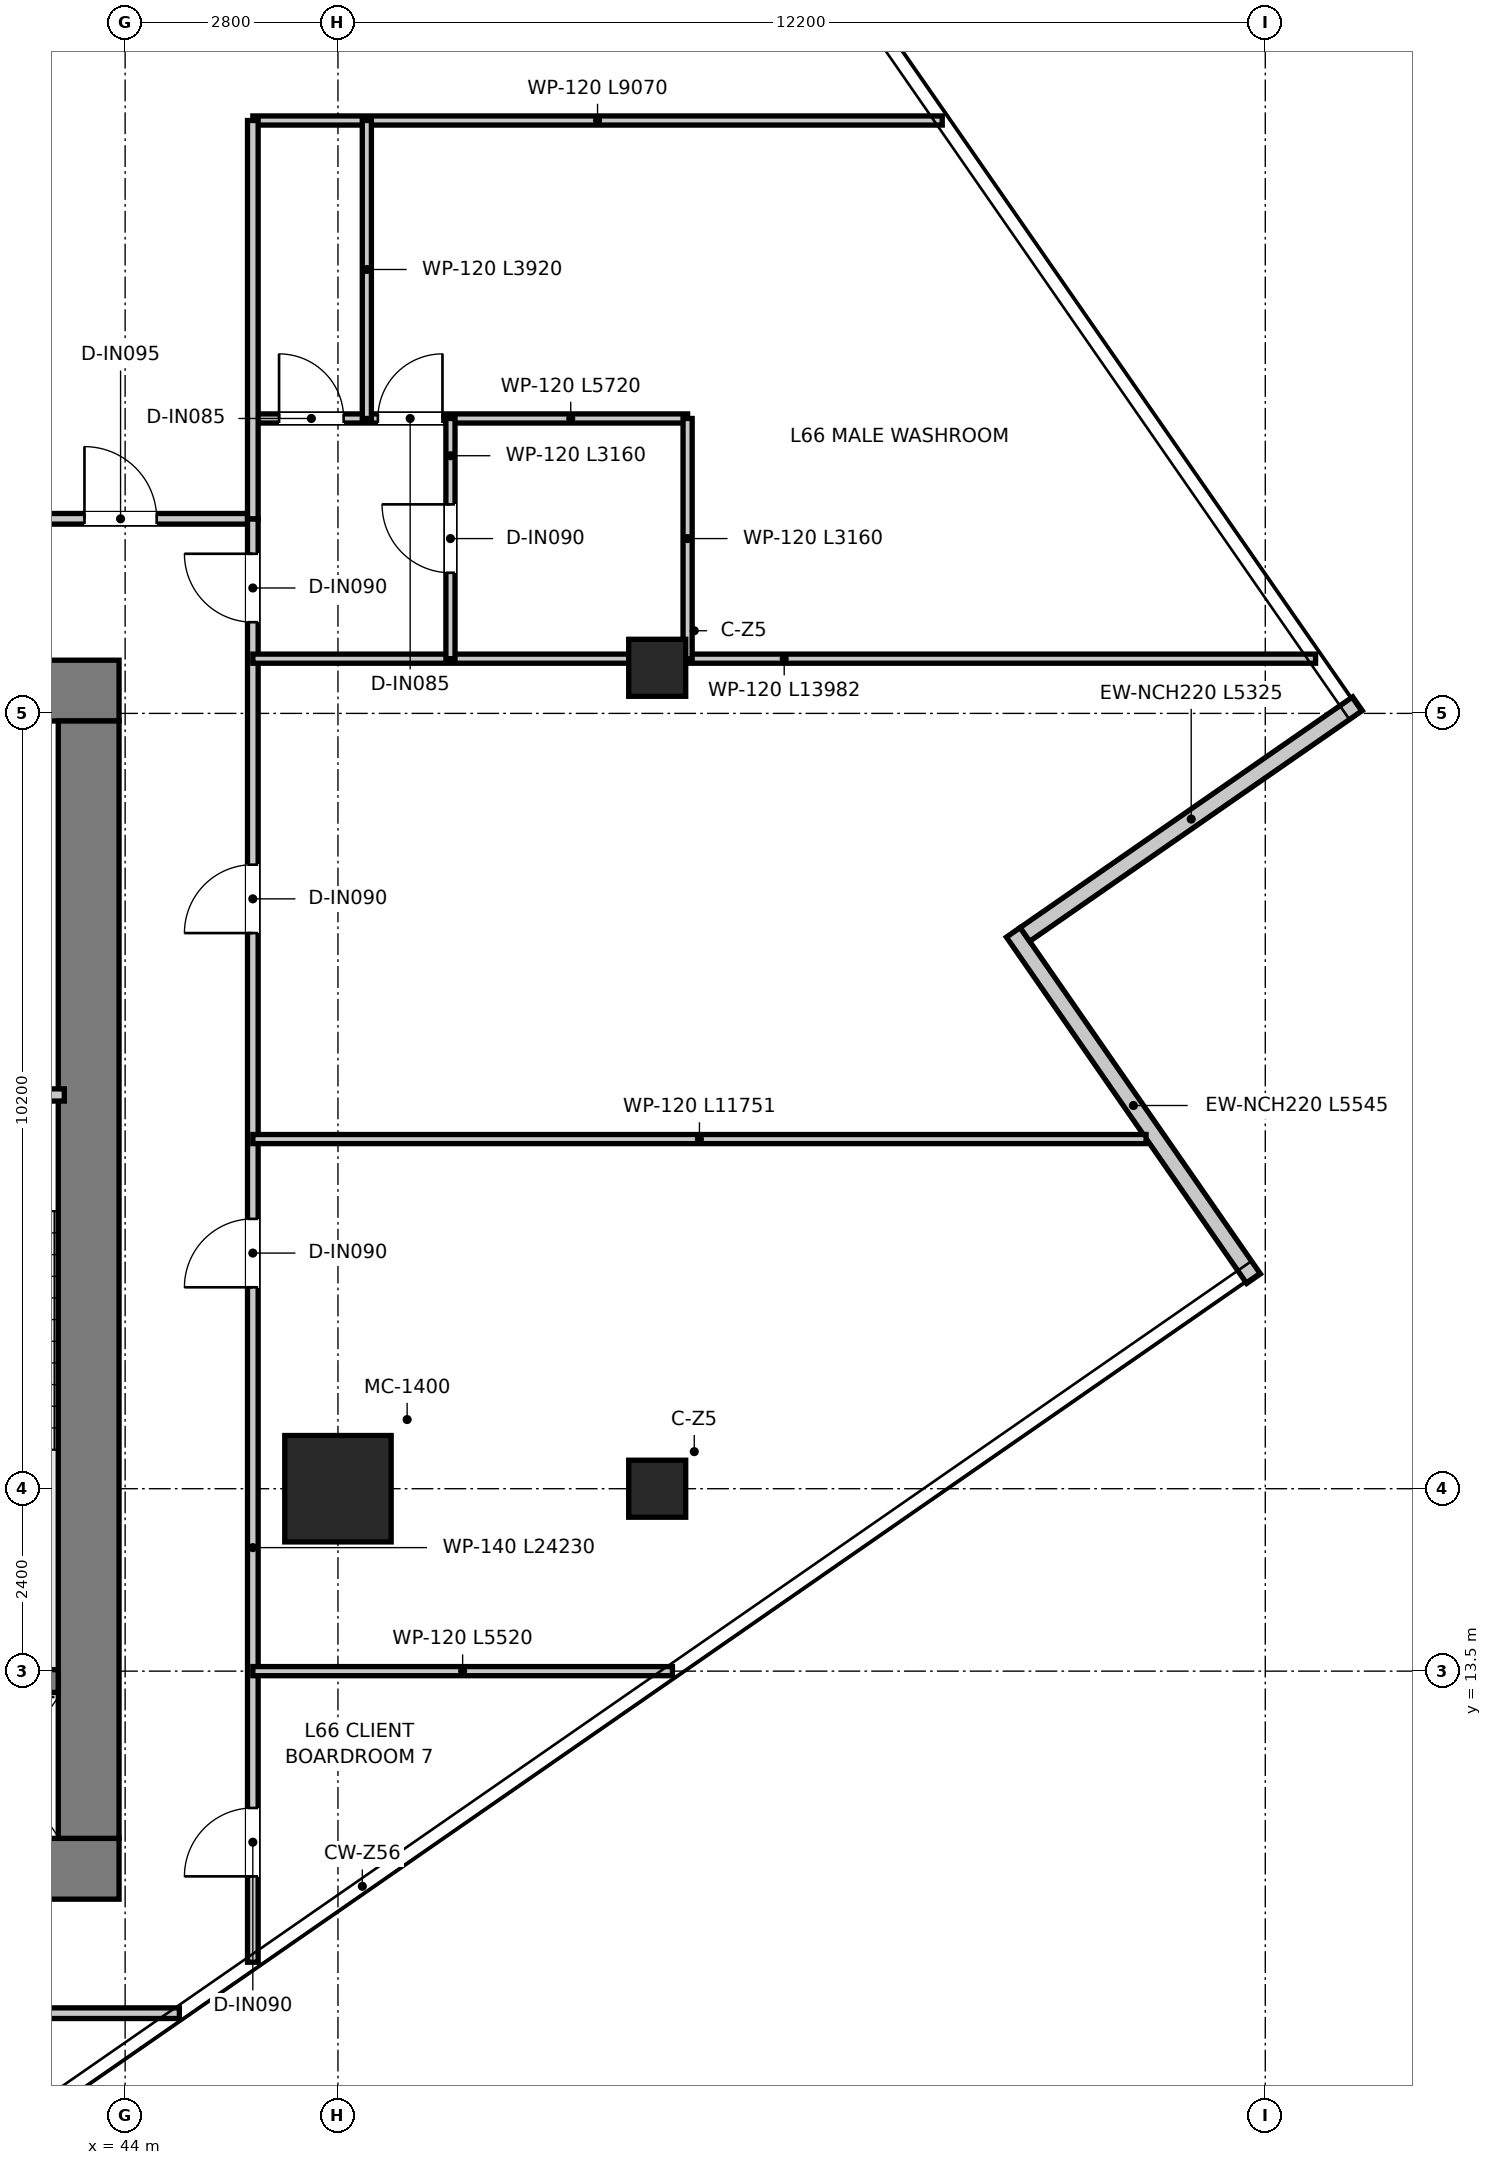
"""IFC4 building model, lengths in metres.
Left out: names, types, materials, properties, quantities, classifications, styles, units other than length and angle.
Written with IfcOpenShell. Run it as: python <this file> out.ifc"""

import sys

from ifc_helpers import new_model, si_unit, direction, frame, frame_2d, origin, origin_2d, place, context, subcontext, project, spatial, rectangle, extrude, source, transform, mapped, element, fill, save


model = new_model("IFC4")
c1 = context("Model", 3, precision=1e-05, world=origin(), true_north=direction((0.0, 1.0)))
c2 = subcontext(c1, "Body", "Model", "MODEL_VIEW")
j1 = project(units=[si_unit("LENGTHUNIT", "METRE"), si_unit("PLANEANGLEUNIT", "RADIAN")], contexts=[c1])
p1 = place(None, origin())
s1 = spatial("IfcSite", under=j1, at=p1, CompositionType="ELEMENT")
p2 = place(p1, origin())
s2 = spatial("IfcBuilding", under=s1, at=p2, CompositionType="ELEMENT")
p3 = place(p2, frame((0.0, 0.0, 271.35)))
s3 = spatial("IfcBuildingStorey", under=s2, at=p3, CompositionType="ELEMENT", Elevation=271.35)
p4 = place(p3, frame((28.08, 10.9, 0.0), z_axis=(0.0, 0.0, 1.0), x_axis=(1.0, 0.0, 0.0)))
e1 = element("IfcWall", 1, at=p4, inside=s3, PredefinedType="SHEAR", context=c2, shape_type="SweptSolid", body=[
    extrude(rectangle(XDim=15.84, YDim=0.8, at=frame_2d((7.92, 0.0))), origin(), (0.0, 0.0, 1.0), 3.95),
])
p5 = place(p3, frame((28.08, 26.4, 0.0), z_axis=(0.0, 0.0, 1.0), x_axis=(1.0, 0.0, 0.0)))
e2 = element("IfcWall", 2, at=p5, inside=s3, PredefinedType="SHEAR", context=c2, shape_type="SweptSolid", body=[
    extrude(rectangle(XDim=15.84, YDim=0.8, at=frame_2d((7.92, 0.0))), origin(), (0.0, 0.0, 1.0), 3.95),
])
p6 = place(p5, frame((7.22, 0.0, 0.0)))
e3 = element("IfcOpeningElement", 3, at=p6, cuts=e2, PredefinedType="OPENING", context=c2, shape_type="SweptSolid", body=[
    extrude(rectangle(XDim=1.4, YDim=2.2, at=frame_2d((0.7, 1.1))), frame((0.0, 0.41, 0.0), z_axis=(0.0, -1.0, 0.0), x_axis=(1.0, 0.0, 0.0)), (0.0, 0.0, 1.0), 0.82),
])
p7 = place(p5, frame((1.775, 0.0, 0.0)))
e4 = element("IfcOpeningElement", 4, at=p7, cuts=e2, PredefinedType="OPENING", context=c2, shape_type="SweptSolid", body=[
    extrude(rectangle(XDim=1.05, YDim=2.1, at=frame_2d((0.525, 1.05))), frame((0.0, 0.41, 0.0), z_axis=(0.0, -1.0, 0.0), x_axis=(1.0, 0.0, 0.0)), (0.0, 0.0, 1.0), 0.82),
])
p8 = place(p5, frame((13.015, 0.0, 0.0)))
e5 = element("IfcOpeningElement", 5, at=p8, cuts=e2, PredefinedType="OPENING", context=c2, shape_type="SweptSolid", body=[
    extrude(rectangle(XDim=1.05, YDim=2.1, at=frame_2d((0.525, 1.05))), frame((0.0, 0.41, 0.0), z_axis=(0.0, -1.0, 0.0), x_axis=(1.0, 0.0, 0.0)), (0.0, 0.0, 1.0), 0.82),
])
p9 = place(p3, frame((43.52, 11.3, 0.0), z_axis=(0.0, 0.0, 1.0), x_axis=(0.0, 1.0, 0.0)))
e6 = element("IfcWall", 6, at=p9, inside=s3, PredefinedType="SHEAR", context=c2, shape_type="SweptSolid", body=[
    extrude(rectangle(XDim=14.7, YDim=0.8, at=frame_2d((7.35, 0.0))), origin(), (0.0, 0.0, 1.0), 3.95),
])
p10 = place(p3, frame((40.02, 13.37, 0.0), z_axis=(0.0, 0.0, 1.0), x_axis=(1.0, 0.0, 0.0)))
e7 = element("IfcWall", 7, at=p10, inside=s3, PredefinedType="SHEAR", context=c2, shape_type="SweptSolid", body=[
    extrude(rectangle(XDim=3.1, YDim=0.3, at=frame_2d((1.55, 0.0))), origin(), (0.0, 0.0, 1.0), 3.95),
])
m1 = source(origin(), c2, "Body", "SweptSolid", [
    extrude(rectangle(XDim=1.4, YDim=1.4, at=origin_2d()), origin(), (0.0, 0.0, 1.0), 3.95),
])
p11 = place(p3, frame((46.8, 15.9, 0.0), z_axis=(0.0, 0.0, 1.0), x_axis=(1.0, 0.0, 0.0)))
e8 = element("IfcColumn", 8, at=p11, inside=s3, PredefinedType="USERDEFINED", context=c2, shape_type="MappedRepresentation", body=[
    mapped(m1, transform((0.0, 0.0, 0.0), x_axis=(1.0, 0.0, 0.0), y_axis=(0.0, 1.0, 0.0), z_axis=(0.0, 0.0, 1.0), scale=1.0)),
])
m2 = source(origin(), c2, "Body", "SweptSolid", [
    extrude(rectangle(XDim=0.75, YDim=0.75, at=origin_2d()), origin(), (0.0, 0.0, 1.0), 3.95),
])
for number, where, z_axis, x_axis in (
    (9, (51.0, 26.7, 0.0), (0.0, 0.0, 1.0), (1.0, 0.0, 0.0)),
    (10, (51.0, 15.9, 0.0), (0.0, 0.0, 1.0), (1.0, 0.0, 0.0)),
):
    element("IfcColumn", number, at=place(p3, frame(where, z_axis=z_axis, x_axis=x_axis)), inside=s3, PredefinedType="COLUMN", context=c2, shape_type="MappedRepresentation", body=[
        mapped(m2, transform((0.0, 0.0, 0.0), x_axis=(1.0, 0.0, 0.0), y_axis=(0.0, 1.0, 0.0), z_axis=(0.0, 0.0, 1.0), scale=1.0)),
    ])
p12 = place(p3, frame((58.845, 18.663, 0.0), z_axis=(0.0, 0.0, 1.0), x_axis=(-0.569988141022, 0.821652918874, 0.0)))
e11 = element("IfcWall", 11, at=p12, inside=s3, PredefinedType="ELEMENTEDWALL", context=c2, shape_type="SweptSolid", body=[
    extrude(rectangle(XDim=5.545, YDim=0.22, at=frame_2d((2.772, 0.0))), origin(), (0.0, 0.0, 1.0), 3.67),
])
p13 = place(p3, frame((55.838, 23.192, 0.0), z_axis=(0.0, 0.0, 1.0), x_axis=(0.821652092748, 0.569989331903, 0.0)))
e12 = element("IfcWall", 12, at=p13, inside=s3, PredefinedType="ELEMENTEDWALL", context=c2, shape_type="SweptSolid", body=[
    extrude(rectangle(XDim=5.325, YDim=0.22, at=frame_2d((2.663, 0.0))), origin(), (0.0, 0.0, 1.0), 3.67),
])
p14 = place(p3, frame((40.04, 21.08, 0.0), z_axis=(0.0, 0.0, 1.0), x_axis=(1.0, 0.0, 0.0)))
e13 = element("IfcWall", 13, at=p14, inside=s3, PredefinedType="PARTITIONING", context=c2, shape_type="SweptSolid", body=[
    extrude(rectangle(XDim=3.16, YDim=0.16, at=frame_2d((1.58, 0.0))), origin(), (0.0, 0.0, 1.0), 3.67),
])
p15 = place(p14, frame((1.055, 0.0, 0.0)))
e14 = element("IfcOpeningElement", 14, at=p15, cuts=e13, PredefinedType="OPENING", context=c2, shape_type="SweptSolid", body=[
    extrude(rectangle(XDim=1.05, YDim=2.1, at=frame_2d((0.525, 1.05))), frame((0.0, 0.09, 0.0), z_axis=(0.0, -1.0, 0.0), x_axis=(1.0, 0.0, 0.0)), (0.0, 0.0, 1.0), 0.18),
])
p16 = place(p3, frame((26.32, 28.66, 0.0), z_axis=(0.0, 0.0, 1.0), x_axis=(1.0, 0.0, 0.0)))
e15 = element("IfcWall", 15, at=p16, inside=s3, PredefinedType="PARTITIONING", context=c2, shape_type="SweptSolid", body=[
    extrude(rectangle(XDim=19.36, YDim=0.14, at=frame_2d((9.68, 0.0))), origin(), (0.0, 0.0, 1.0), 3.18),
])
p17 = place(p16, frame((1.265, 0.0, 0.0)))
e16 = element("IfcOpeningElement", 16, at=p17, cuts=e15, PredefinedType="OPENING", context=c2, shape_type="SweptSolid", body=[
    extrude(rectangle(XDim=0.95, YDim=2.1, at=frame_2d((0.475, 1.05))), frame((0.0, 0.08, 0.0), z_axis=(0.0, -1.0, 0.0), x_axis=(1.0, 0.0, 0.0)), (0.0, 0.0, 1.0), 0.16),
])
p18 = place(p16, frame((6.105, 0.0, 0.0)))
e17 = element("IfcOpeningElement", 17, at=p18, cuts=e15, PredefinedType="OPENING", context=c2, shape_type="SweptSolid", body=[
    extrude(rectangle(XDim=0.95, YDim=2.1, at=frame_2d((0.475, 1.05))), frame((0.0, 0.08, 0.0), z_axis=(0.0, -1.0, 0.0), x_axis=(1.0, 0.0, 0.0)), (0.0, 0.0, 1.0), 0.16),
])
p19 = place(p16, frame((12.305, 0.0, 0.0)))
e18 = element("IfcOpeningElement", 18, at=p19, cuts=e15, PredefinedType="OPENING", context=c2, shape_type="SweptSolid", body=[
    extrude(rectangle(XDim=0.95, YDim=2.1, at=frame_2d((0.475, 1.05))), frame((0.0, 0.08, 0.0), z_axis=(0.0, -1.0, 0.0), x_axis=(1.0, 0.0, 0.0)), (0.0, 0.0, 1.0), 0.16),
])
p20 = place(p16, frame((17.145, 0.0, 0.0)))
e19 = element("IfcOpeningElement", 19, at=p20, cuts=e15, PredefinedType="OPENING", context=c2, shape_type="SweptSolid", body=[
    extrude(rectangle(XDim=0.95, YDim=2.1, at=frame_2d((0.475, 1.05))), frame((0.0, 0.08, 0.0), z_axis=(0.0, -1.0, 0.0), x_axis=(1.0, 0.0, 0.0)), (0.0, 0.0, 1.0), 0.16),
])
p21 = place(p3, frame((45.68, 9.67, 0.0), z_axis=(0.0, 0.0, 1.0), x_axis=(0.0, 1.0, 0.0)))
e20 = element("IfcWall", 20, at=p21, inside=s3, PredefinedType="PARTITIONING", context=c2, shape_type="SweptSolid", body=[
    extrude(rectangle(XDim=18.99, YDim=0.14, at=frame_2d((9.495, 0.0))), origin(), (0.0, 0.0, 1.0), 3.13),
])
p22 = place(p21, frame((17.63, 0.0, 0.0)))
e21 = element("IfcOpeningElement", 21, at=p22, cuts=e20, PredefinedType="OPENING", context=c2, shape_type="SweptSolid", body=[
    extrude(rectangle(XDim=0.9, YDim=2.1, at=frame_2d((0.45, 1.05))), frame((0.0, 0.08, 0.0), z_axis=(0.0, -1.0, 0.0), x_axis=(1.0, 0.0, 0.0)), (0.0, 0.0, 1.0), 0.16),
])
p23 = place(p21, frame((1.13, 0.0, 0.0)))
e22 = element("IfcOpeningElement", 22, at=p23, cuts=e20, PredefinedType="OPENING", context=c2, shape_type="SweptSolid", body=[
    extrude(rectangle(XDim=0.9, YDim=2.1, at=frame_2d((0.45, 1.05))), frame((0.0, 0.08, 0.0), z_axis=(0.0, -1.0, 0.0), x_axis=(1.0, 0.0, 0.0)), (0.0, 0.0, 1.0), 0.16),
])
p24 = place(p21, frame((8.88, 0.0, 0.0)))
e23 = element("IfcOpeningElement", 23, at=p24, cuts=e20, PredefinedType="OPENING", context=c2, shape_type="SweptSolid", body=[
    extrude(rectangle(XDim=0.9, YDim=2.1, at=frame_2d((0.45, 1.05))), frame((0.0, 0.08, 0.0), z_axis=(0.0, -1.0, 0.0), x_axis=(1.0, 0.0, 0.0)), (0.0, 0.0, 1.0), 0.16),
])
p25 = place(p21, frame((13.54, 0.0, 0.0)))
e24 = element("IfcOpeningElement", 24, at=p25, cuts=e20, PredefinedType="OPENING", context=c2, shape_type="SweptSolid", body=[
    extrude(rectangle(XDim=0.9, YDim=2.1, at=frame_2d((0.45, 1.05))), frame((0.0, 0.08, 0.0), z_axis=(0.0, -1.0, 0.0), x_axis=(1.0, 0.0, 0.0)), (0.0, 0.0, 1.0), 0.16),
])
p26 = place(p3, frame((24.534, 9.0, 0.0), z_axis=(0.0, 0.0, 1.0), x_axis=(1.0, 0.0, 0.0)))
e25 = element("IfcWall", 25, at=p26, inside=s3, PredefinedType="PARTITIONING", context=c2, shape_type="SweptSolid", body=[
    extrude(rectangle(XDim=20.18, YDim=0.14, at=frame_2d((10.09, 0.0))), origin(), (0.0, 0.0, 1.0), 3.67),
])
p27 = place(p26, frame((7.041, 0.0, 0.0)))
e26 = element("IfcOpeningElement", 26, at=p27, cuts=e25, PredefinedType="OPENING", context=c2, shape_type="SweptSolid", body=[
    extrude(rectangle(XDim=0.85, YDim=2.1, at=frame_2d((0.425, 1.05))), frame((0.0, 0.08, 0.0), z_axis=(0.0, -1.0, 0.0), x_axis=(1.0, 0.0, 0.0)), (0.0, 0.0, 1.0), 0.16),
])
p28 = place(p26, frame((15.041, 0.0, 0.0)))
e27 = element("IfcOpeningElement", 27, at=p28, cuts=e25, PredefinedType="OPENING", context=c2, shape_type="SweptSolid", body=[
    extrude(rectangle(XDim=0.85, YDim=2.1, at=frame_2d((0.425, 1.05))), frame((0.0, 0.08, 0.0), z_axis=(0.0, -1.0, 0.0), x_axis=(1.0, 0.0, 0.0)), (0.0, 0.0, 1.0), 0.16),
])
p29 = place(p3, frame((45.68, 26.82, 0.0), z_axis=(0.0, 0.0, 1.0), x_axis=(1.0, 0.0, 0.0)))
e28 = element("IfcWall", 28, at=p29, inside=s3, PredefinedType="PARTITIONING", context=c2, shape_type="SweptSolid", body=[
    extrude(rectangle(XDim=13.982, YDim=0.12, at=frame_2d((6.991, 0.0))), origin(), (0.0, 0.0, 1.0), 3.13),
])
p30 = place(p3, frame((45.68, 33.9, 0.0), z_axis=(0.0, 0.0, 1.0), x_axis=(1.0, 0.0, 0.0)))
e29 = element("IfcWall", 29, at=p30, inside=s3, PredefinedType="PARTITIONING", context=c2, shape_type="SweptSolid", body=[
    extrude(rectangle(XDim=9.07, YDim=0.12, at=frame_2d((4.535, 0.0))), origin(), (0.0, 0.0, 1.0), 3.13),
])
p31 = place(p3, frame((45.68, 29.98, 0.0), z_axis=(0.0, 0.0, 1.0), x_axis=(1.0, 0.0, 0.0)))
e30 = element("IfcWall", 30, at=p31, inside=s3, PredefinedType="PARTITIONING", context=c2, shape_type="SweptSolid", body=[
    extrude(rectangle(XDim=5.72, YDim=0.12, at=frame_2d((2.86, 0.0))), origin(), (0.0, 0.0, 1.0), 3.13),
])
p32 = place(p31, frame((1.645, 0.0, 0.0)))
e31 = element("IfcOpeningElement", 31, at=p32, cuts=e30, PredefinedType="OPENING", context=c2, shape_type="SweptSolid", body=[
    extrude(rectangle(XDim=0.85, YDim=2.1, at=frame_2d((0.425, 1.05))), frame((0.0, 0.07, 0.0), z_axis=(0.0, -1.0, 0.0), x_axis=(1.0, 0.0, 0.0)), (0.0, 0.0, 1.0), 0.14),
])
p33 = place(p31, frame((0.345, 0.0, 0.0)))
e32 = element("IfcOpeningElement", 32, at=p33, cuts=e30, PredefinedType="OPENING", context=c2, shape_type="SweptSolid", body=[
    extrude(rectangle(XDim=0.85, YDim=2.1, at=frame_2d((0.425, 1.05))), frame((0.0, 0.07, 0.0), z_axis=(0.0, -1.0, 0.0), x_axis=(1.0, 0.0, 0.0)), (0.0, 0.0, 1.0), 0.14),
])
p34 = place(p3, frame((51.4, 26.82, 0.0), z_axis=(0.0, 0.0, 1.0), x_axis=(0.0, 1.0, 0.0)))
e33 = element("IfcWall", 33, at=p34, inside=s3, PredefinedType="PARTITIONING", context=c2, shape_type="SweptSolid", body=[
    extrude(rectangle(XDim=3.16, YDim=0.12, at=frame_2d((1.58, 0.0))), origin(), (0.0, 0.0, 1.0), 3.67),
])
p35 = place(p3, frame((48.28, 26.82, 0.0), z_axis=(0.0, 0.0, 1.0), x_axis=(0.0, 1.0, 0.0)))
e34 = element("IfcWall", 34, at=p35, inside=s3, PredefinedType="PARTITIONING", context=c2, shape_type="SweptSolid", body=[
    extrude(rectangle(XDim=3.16, YDim=0.12, at=frame_2d((1.58, 0.0))), origin(), (0.0, 0.0, 1.0), 3.18),
])
p36 = place(p35, frame((1.13, 0.0, 0.0)))
e35 = element("IfcOpeningElement", 35, at=p36, cuts=e34, PredefinedType="OPENING", context=c2, shape_type="SweptSolid", body=[
    extrude(rectangle(XDim=0.9, YDim=2.1, at=frame_2d((0.45, 1.05))), frame((0.0, 0.07, 0.0), z_axis=(0.0, -1.0, 0.0), x_axis=(1.0, 0.0, 0.0)), (0.0, 0.0, 1.0), 0.14),
])
p37 = place(p3, frame((47.18, 29.98, 0.0), z_axis=(0.0, 0.0, 1.0), x_axis=(0.0, 1.0, 0.0)))
e36 = element("IfcWall", 36, at=p37, inside=s3, PredefinedType="PARTITIONING", context=c2, shape_type="SweptSolid", body=[
    extrude(rectangle(XDim=3.92, YDim=0.12, at=frame_2d((1.96, 0.0))), origin(), (0.0, 0.0, 1.0), 3.31),
])
p38 = place(p3, frame((45.68, 28.66, 0.0), z_axis=(0.0, 0.0, 1.0), x_axis=(0.0, 1.0, 0.0)))
e37 = element("IfcWall", 37, at=p38, inside=s3, PredefinedType="PARTITIONING", context=c2, shape_type="SweptSolid", body=[
    extrude(rectangle(XDim=5.24, YDim=0.14, at=frame_2d((2.62, 0.0))), origin(), (0.0, 0.0, 1.0), 3.43),
])
p39 = place(p3, frame((45.68, 13.5, 0.0), z_axis=(0.0, 0.0, 1.0), x_axis=(1.0, 0.0, 0.0)))
e38 = element("IfcWall", 38, at=p39, inside=s3, PredefinedType="PARTITIONING", context=c2, shape_type="SweptSolid", body=[
    extrude(rectangle(XDim=5.521, YDim=0.12, at=frame_2d((2.76, 0.0))), origin(), (0.0, 0.0, 1.0), 3.18),
])
p40 = place(p3, frame((45.68, 20.5, 0.0), z_axis=(0.0, 0.0, 1.0), x_axis=(1.0, 0.0, 0.0)))
e39 = element("IfcWall", 39, at=p40, inside=s3, PredefinedType="PARTITIONING", context=c2, shape_type="SweptSolid", body=[
    extrude(rectangle(XDim=11.751, YDim=0.12, at=frame_2d((5.876, 0.0))), origin(), (0.0, 0.0, 1.0), 3.13),
])
p41 = place(p22, origin())
e40 = element("IfcDoor", 40, at=p41, inside=s3, OperationType="SINGLE_SWING_RIGHT", PredefinedType="DOOR", context=c2, shape_type="SweptSolid", body=[
    extrude(rectangle(XDim=0.9, YDim=2.1, at=frame_2d((0.45, 1.05))), frame((0.0, 0.025, 0.0), z_axis=(0.0, -1.0, 0.0), x_axis=(1.0, 0.0, 0.0)), (0.0, 0.0, 1.0), 0.05),
])
fill(e21, e40)
p42 = place(p32, origin())
e41 = element("IfcDoor", 41, at=p42, inside=s3, OperationType="SINGLE_SWING_RIGHT", PredefinedType="DOOR", context=c2, shape_type="SweptSolid", body=[
    extrude(rectangle(XDim=0.85, YDim=2.1, at=frame_2d((0.425, 1.05))), frame((0.0, 0.025, 0.0), z_axis=(0.0, -1.0, 0.0), x_axis=(1.0, 0.0, 0.0)), (0.0, 0.0, 1.0), 0.05),
])
fill(e31, e41)
p43 = place(p33, origin())
e42 = element("IfcDoor", 42, at=p43, inside=s3, OperationType="SINGLE_SWING_LEFT", PredefinedType="DOOR", context=c2, shape_type="SweptSolid", body=[
    extrude(rectangle(XDim=0.85, YDim=2.1, at=frame_2d((0.425, 1.05))), frame((0.0, 0.025, 0.0), z_axis=(0.0, -1.0, 0.0), x_axis=(1.0, 0.0, 0.0)), (0.0, 0.0, 1.0), 0.05),
])
fill(e32, e42)
p44 = place(p36, origin())
e43 = element("IfcDoor", 43, at=p44, inside=s3, OperationType="SINGLE_SWING_RIGHT", PredefinedType="DOOR", context=c2, shape_type="SweptSolid", body=[
    extrude(rectangle(XDim=0.9, YDim=2.1, at=frame_2d((0.45, 1.05))), frame((0.0, 0.025, 0.0), z_axis=(0.0, -1.0, 0.0), x_axis=(1.0, 0.0, 0.0)), (0.0, 0.0, 1.0), 0.05),
])
fill(e35, e43)
p45 = place(p20, origin())
e44 = element("IfcDoor", 44, at=p45, inside=s3, OperationType="SINGLE_SWING_LEFT", PredefinedType="DOOR", context=c2, shape_type="SweptSolid", body=[
    extrude(rectangle(XDim=0.95, YDim=2.1, at=frame_2d((0.475, 1.05))), frame((0.0, 0.025, 0.0), z_axis=(0.0, -1.0, 0.0), x_axis=(1.0, 0.0, 0.0)), (0.0, 0.0, 1.0), 0.05),
])
fill(e19, e44)
p46 = place(p23, origin())
e45 = element("IfcDoor", 45, at=p46, inside=s3, OperationType="SINGLE_SWING_LEFT", PredefinedType="DOOR", context=c2, shape_type="SweptSolid", body=[
    extrude(rectangle(XDim=0.9, YDim=2.1, at=frame_2d((0.45, 1.05))), frame((0.0, 0.025, 0.0), z_axis=(0.0, -1.0, 0.0), x_axis=(1.0, 0.0, 0.0)), (0.0, 0.0, 1.0), 0.05),
])
fill(e22, e45)
p47 = place(p24, origin())
e46 = element("IfcDoor", 46, at=p47, inside=s3, OperationType="SINGLE_SWING_LEFT", PredefinedType="DOOR", context=c2, shape_type="SweptSolid", body=[
    extrude(rectangle(XDim=0.9, YDim=2.1, at=frame_2d((0.45, 1.05))), frame((0.0, 0.025, 0.0), z_axis=(0.0, -1.0, 0.0), x_axis=(1.0, 0.0, 0.0)), (0.0, 0.0, 1.0), 0.05),
])
fill(e23, e46)
p48 = place(p25, origin())
e47 = element("IfcDoor", 47, at=p48, inside=s3, OperationType="SINGLE_SWING_LEFT", PredefinedType="DOOR", context=c2, shape_type="SweptSolid", body=[
    extrude(rectangle(XDim=0.9, YDim=2.1, at=frame_2d((0.45, 1.05))), frame((0.0, 0.025, 0.0), z_axis=(0.0, -1.0, 0.0), x_axis=(1.0, 0.0, 0.0)), (0.0, 0.0, 1.0), 0.05),
])
fill(e24, e47)
save(model, sys.argv[1])
